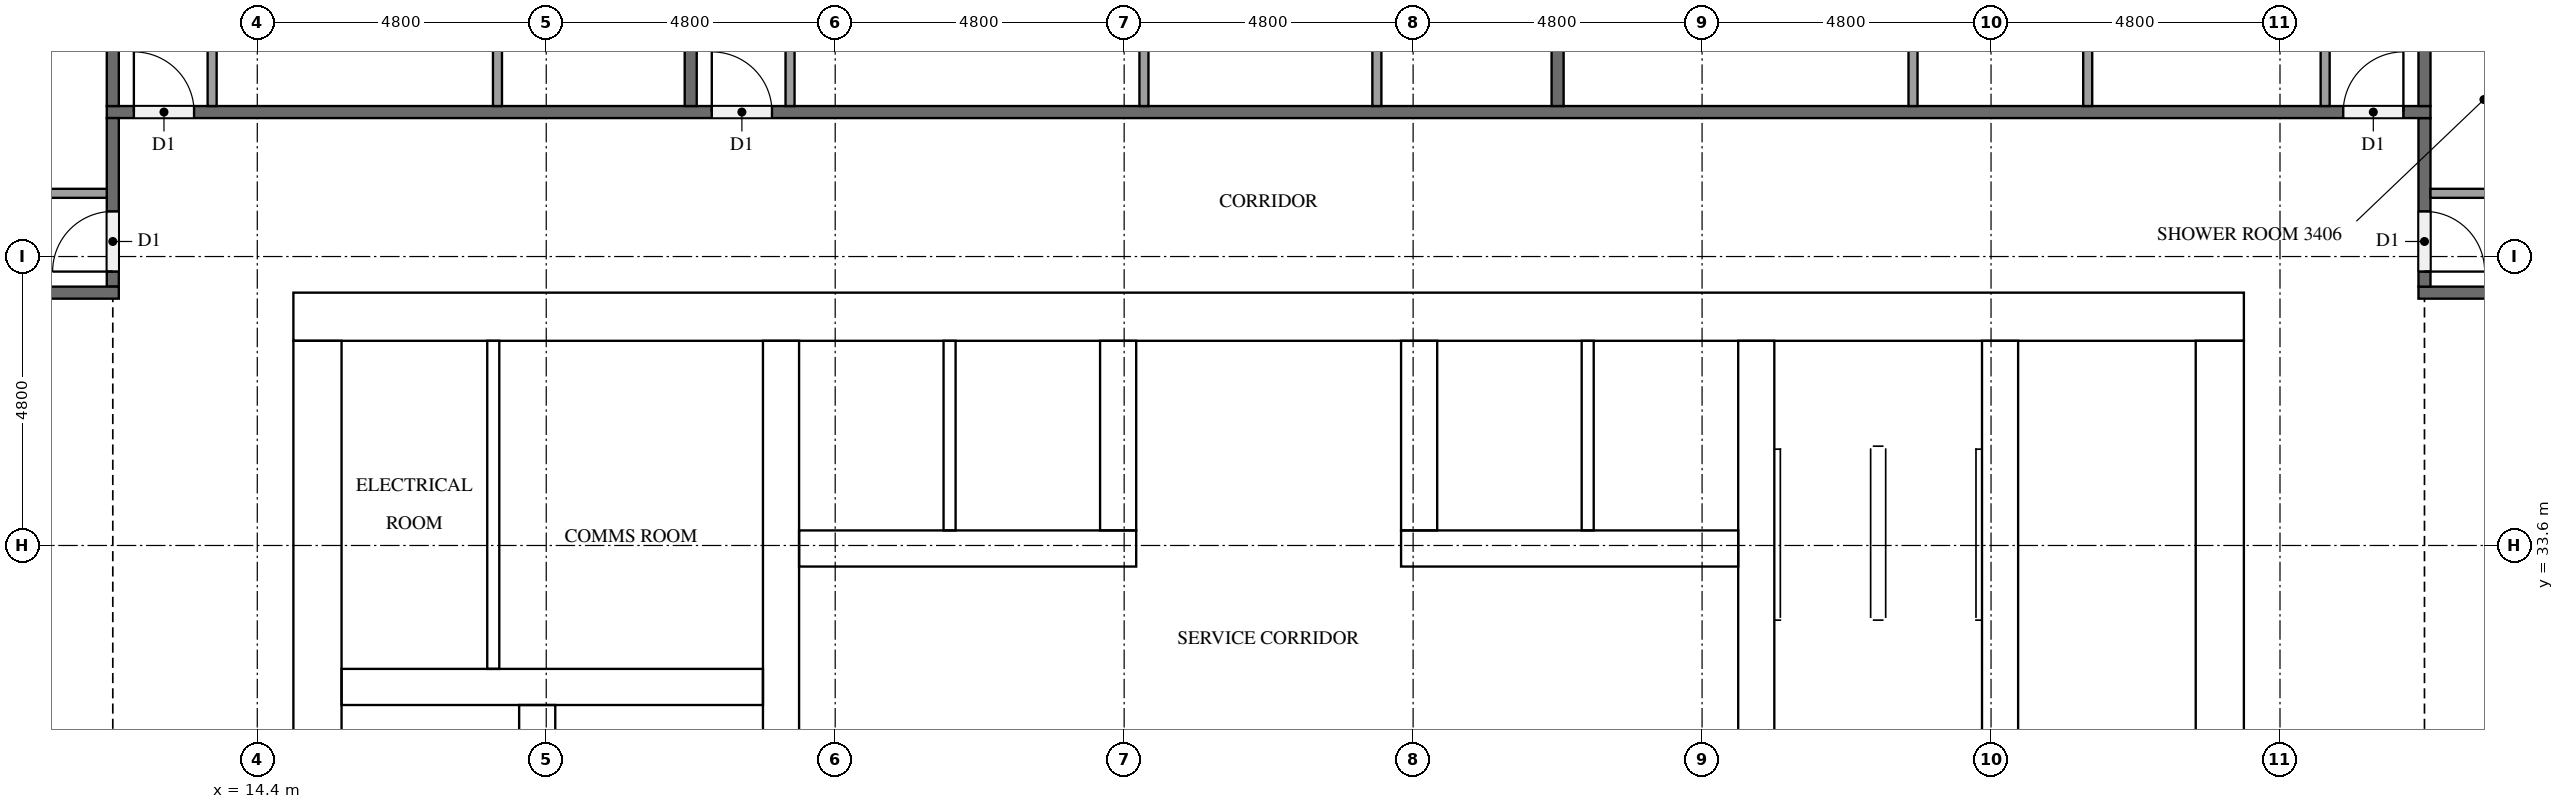
"""IFC4 building model, lengths in metres.
Left out: names, types, materials, properties, quantities, classifications, styles, units other than length and angle.
Written with IfcOpenShell. Run it as: python <this file> out.ifc"""

import sys

from ifc_helpers import new_model, si_unit, direction, frame, frame_2d, origin, place, context, subcontext, project, spatial, rectangle, extrude, element, fill, save


model = new_model("IFC4")
c1 = context("Model", 3, precision=1e-05, world=origin(), true_north=direction((0.0, 1.0)))
c2 = subcontext(c1, "Body", "Model", "MODEL_VIEW")
j1 = project(units=[si_unit("LENGTHUNIT", "METRE"), si_unit("PLANEANGLEUNIT", "RADIAN")], contexts=[c1])
p1 = place(None, origin())
s1 = spatial("IfcSite", under=j1, at=p1, CompositionType="ELEMENT")
p2 = place(p1, origin())
s2 = spatial("IfcBuilding", under=s1, at=p2, CompositionType="ELEMENT")
p3 = place(p2, frame((0.0, 0.0, 133.1)))
s3 = spatial("IfcBuildingStorey", under=s2, at=p3, CompositionType="ELEMENT", Elevation=133.1)
p4 = place(p3, frame((15.0, 37.4, 0.0), z_axis=(0.0, 0.0, 1.0), x_axis=(1.0, 0.0, 0.0)))
e1 = element("IfcWall", 1, at=p4, inside=s3, PredefinedType="SHEAR", context=c2, shape_type="SweptSolid", body=[
    extrude(rectangle(XDim=32.4, YDim=0.8, at=frame_2d((16.2, 0.0))), origin(), (0.0, 0.0, 1.0), 3.2),
])
p5 = place(p4, frame((15.3, 0.0, 0.0)))
e2 = element("IfcOpeningElement", 2, at=p5, cuts=e1, PredefinedType="OPENING", context=c2, shape_type="SweptSolid", body=[
    extrude(rectangle(XDim=1.8, YDim=2.1, at=frame_2d((0.9, 1.05))), frame((0.0, 0.41, 0.0), z_axis=(0.0, -1.0, 0.0), x_axis=(1.0, 0.0, 0.0)), (0.0, 0.0, 1.0), 0.82),
])
p6 = place(p4, frame((1.51, 0.0, 0.0)))
e3 = element("IfcOpeningElement", 3, at=p6, cuts=e1, PredefinedType="OPENING", context=c2, shape_type="SweptSolid", body=[
    extrude(rectangle(XDim=1.0, YDim=2.1, at=frame_2d((0.5, 1.05))), frame((0.0, 0.41, 0.0), z_axis=(0.0, -1.0, 0.0), x_axis=(1.0, 0.0, 0.0)), (0.0, 0.0, 1.0), 0.82),
])
p7 = place(p4, frame((5.11, 0.0, 0.0)))
e4 = element("IfcOpeningElement", 4, at=p7, cuts=e1, PredefinedType="OPENING", context=c2, shape_type="SweptSolid", body=[
    extrude(rectangle(XDim=1.0, YDim=2.1, at=frame_2d((0.5, 1.05))), frame((0.0, 0.41, 0.0), z_axis=(0.0, -1.0, 0.0), x_axis=(1.0, 0.0, 0.0)), (0.0, 0.0, 1.0), 0.82),
])
p8 = place(p3, frame((15.4, 15.8, 0.0), z_axis=(0.0, 0.0, 1.0), x_axis=(0.0, 1.0, 0.0)))
e5 = element("IfcWall", 5, at=p8, inside=s3, PredefinedType="SHEAR", context=c2, shape_type="SweptSolid", body=[
    extrude(rectangle(XDim=21.2, YDim=0.8, at=frame_2d((10.6, 0.0))), origin(), (0.0, 0.0, 1.0), 3.2),
])
p9 = place(p8, frame((4.96, 0.0, 0.0)))
e6 = element("IfcOpeningElement", 6, at=p9, cuts=e5, PredefinedType="OPENING", context=c2, shape_type="SweptSolid", body=[
    extrude(rectangle(XDim=1.2, YDim=2.1, at=frame_2d((0.6, 1.05))), frame((0.0, 0.41, 0.0), z_axis=(0.0, -1.0, 0.0), x_axis=(1.0, 0.0, 0.0)), (0.0, 0.0, 1.0), 0.82),
])
p10 = place(p3, frame((47.0, 15.8, 0.0), z_axis=(0.0, 0.0, 1.0), x_axis=(0.0, 1.0, 0.0)))
e7 = element("IfcWall", 7, at=p10, inside=s3, PredefinedType="SHEAR", context=c2, shape_type="SweptSolid", body=[
    extrude(rectangle(XDim=21.2, YDim=0.8, at=frame_2d((10.6, 0.0))), origin(), (0.0, 0.0, 1.0), 3.2),
])
p11 = place(p10, frame((10.3, 0.0, 0.0)))
e8 = element("IfcOpeningElement", 8, at=p11, cuts=e7, PredefinedType="OPENING", context=c2, shape_type="SweptSolid", body=[
    extrude(rectangle(XDim=1.2, YDim=2.1, at=frame_2d((0.6, 1.05))), frame((0.0, 0.41, 0.0), z_axis=(0.0, -1.0, 0.0), x_axis=(1.0, 0.0, 0.0)), (0.0, 0.0, 1.0), 0.82),
])
p12 = place(p3, frame((19.05, 15.8, 0.0), z_axis=(0.0, 0.0, 1.0), x_axis=(0.0, 1.0, 0.0)))
e9 = element("IfcWall", 9, at=p12, inside=s3, PredefinedType="SHEAR", context=c2, shape_type="SweptSolid", body=[
    extrude(rectangle(XDim=15.15, YDim=0.6, at=frame_2d((7.575, 0.0))), origin(), (0.0, 0.0, 1.0), 3.2),
])
p13 = place(p12, frame((9.65, 0.0, 0.0)))
e10 = element("IfcOpeningElement", 10, at=p13, cuts=e9, PredefinedType="OPENING", context=c2, shape_type="SweptSolid", body=[
    extrude(rectangle(XDim=1.1, YDim=2.1, at=frame_2d((0.55, 1.05))), frame((0.0, 0.31, 0.0), z_axis=(0.0, -1.0, 0.0), x_axis=(1.0, 0.0, 0.0)), (0.0, 0.0, 1.0), 0.62),
])
p14 = place(p12, frame((13.15, 0.0, 0.0)))
e11 = element("IfcOpeningElement", 11, at=p14, cuts=e9, PredefinedType="OPENING", context=c2, shape_type="SweptSolid", body=[
    extrude(rectangle(XDim=1.1, YDim=2.1, at=frame_2d((0.55, 1.05))), frame((0.0, 0.31, 0.0), z_axis=(0.0, -1.0, 0.0), x_axis=(1.0, 0.0, 0.0)), (0.0, 0.0, 1.0), 0.62),
])
p15 = place(p12, frame((0.4, 0.0, 0.0)))
e12 = element("IfcOpeningElement", 12, at=p15, cuts=e9, PredefinedType="OPENING", context=c2, shape_type="SweptSolid", body=[
    extrude(rectangle(XDim=1.2, YDim=2.1, at=frame_2d((0.6, 1.05))), frame((0.0, 0.31, 0.0), z_axis=(0.0, -1.0, 0.0), x_axis=(1.0, 0.0, 0.0)), (0.0, 0.0, 1.0), 0.62),
])
p16 = place(p3, frame((23.1, 15.8, 0.0), z_axis=(0.0, 0.0, 1.0), x_axis=(0.0, 1.0, 0.0)))
e13 = element("IfcWall", 13, at=p16, inside=s3, PredefinedType="SHEAR", context=c2, shape_type="SweptSolid", body=[
    extrude(rectangle(XDim=21.2, YDim=0.6, at=frame_2d((10.6, 0.0))), origin(), (0.0, 0.0, 1.0), 3.2),
])
p17 = place(p3, frame((39.3, 27.75, 0.0), z_axis=(0.0, 0.0, 1.0), x_axis=(0.0, 1.0, 0.0)))
e14 = element("IfcWall", 14, at=p17, inside=s3, PredefinedType="SHEAR", context=c2, shape_type="SweptSolid", body=[
    extrude(rectangle(XDim=9.25, YDim=0.6, at=frame_2d((4.625, 0.0))), origin(), (0.0, 0.0, 1.0), 3.2),
])
p18 = place(p3, frame((43.35, 27.75, 0.0), z_axis=(0.0, 0.0, 1.0), x_axis=(0.0, 1.0, 0.0)))
e15 = element("IfcWall", 15, at=p18, inside=s3, PredefinedType="SHEAR", context=c2, shape_type="SweptSolid", body=[
    extrude(rectangle(XDim=9.25, YDim=0.6, at=frame_2d((4.625, 0.0))), origin(), (0.0, 0.0, 1.0), 3.2),
])
p19 = place(p18, frame((7.65, 0.0, 0.0)))
e16 = element("IfcOpeningElement", 16, at=p19, cuts=e15, PredefinedType="OPENING", context=c2, shape_type="SweptSolid", body=[
    extrude(rectangle(XDim=1.2, YDim=2.1, at=frame_2d((0.6, 1.05))), frame((0.0, 0.31, 0.0), z_axis=(0.0, -1.0, 0.0), x_axis=(1.0, 0.0, 0.0)), (0.0, 0.0, 1.0), 0.62),
])
p20 = place(p3, frame((15.8, 31.25, 0.0), z_axis=(0.0, 0.0, 1.0), x_axis=(1.0, 0.0, 0.0)))
e17 = element("IfcWall", 17, at=p20, inside=s3, PredefinedType="SHEAR", context=c2, shape_type="SweptSolid", body=[
    extrude(rectangle(XDim=7.0, YDim=0.6, at=frame_2d((3.5, 0.0))), origin(), (0.0, 0.0, 1.0), 3.2),
])
for number, where, z_axis, x_axis in (
    (18, (23.4, 33.55, 0.0), (0.0, 0.0, 1.0), (1.0, 0.0, 0.0)),
    (19, (33.4, 33.55, 0.0), (0.0, 0.0, 1.0), (1.0, 0.0, 0.0)),
):
    element("IfcWall", number, at=place(p3, frame(where, z_axis=z_axis, x_axis=x_axis)), inside=s3, PredefinedType="SHEAR", context=c2, shape_type="SweptSolid", body=[
        extrude(rectangle(XDim=5.6, YDim=0.6, at=frame_2d((2.8, 0.0))), origin(), (0.0, 0.0, 1.0), 3.2),
    ])
for number, where, z_axis, x_axis in (
    (20, (28.7, 33.85, 0.0), (0.0, 0.0, 1.0), (0.0, 1.0, 0.0)),
    (21, (33.7, 33.85, 0.0), (0.0, 0.0, 1.0), (0.0, 1.0, 0.0)),
):
    element("IfcWall", number, at=place(p3, frame(where, z_axis=z_axis, x_axis=x_axis)), inside=s3, PredefinedType="SHEAR", context=c2, shape_type="SweptSolid", body=[
        extrude(rectangle(XDim=3.15, YDim=0.6, at=frame_2d((1.575, 0.0))), origin(), (0.0, 0.0, 1.0), 3.2),
    ])
for number, where, z_axis, x_axis in (
    (22, (25.9, 33.85, 0.0), (0.0, 0.0, 1.0), (0.0, 1.0, 0.0)),
    (23, (36.5, 33.85, 0.0), (0.0, 0.0, 1.0), (0.0, 1.0, 0.0)),
):
    element("IfcWall", number, at=place(p3, frame(where, z_axis=z_axis, x_axis=x_axis)), inside=s3, PredefinedType="SOLIDWALL", context=c2, shape_type="SweptSolid", body=[
        extrude(rectangle(XDim=3.15, YDim=0.2, at=frame_2d((1.575, 0.0))), origin(), (0.0, 0.0, 1.0), 3.2),
    ])
p21 = place(p3, frame((18.32, 31.55, 0.0), z_axis=(0.0, 0.0, 1.0), x_axis=(0.0, 1.0, 0.0)))
e24 = element("IfcWall", 24, at=p21, inside=s3, PredefinedType="PARTITIONING", context=c2, shape_type="SweptSolid", body=[
    extrude(rectangle(XDim=5.45, YDim=0.2, at=frame_2d((2.725, 0.0))), origin(), (0.0, 0.0, 1.0), 3.2),
])
p22 = place(p3, frame((52.5, 37.8, 0.0), z_axis=(0.0, 0.0, 1.0), x_axis=(-1.0, 0.0, 0.0)))
e25 = element("IfcWall", 25, at=p22, inside=s3, PredefinedType="PARTITIONING", context=c2, shape_type="SweptSolid", body=[
    extrude(rectangle(XDim=2.2, YDim=0.2, at=frame_2d((1.1, 0.0))), origin(), (0.0, 0.0, 1.0), 3.2),
])
p23 = place(p3, frame((50.4, 40.7, 0.0), z_axis=(0.0, 0.0, 1.0), x_axis=(0.0, -1.0, 0.0)))
e26 = element("IfcWall", 26, at=p23, inside=s3, PredefinedType="PARTITIONING", context=c2, shape_type="SweptSolid", body=[
    extrude(rectangle(XDim=2.8, YDim=0.2, at=frame_2d((1.4, 0.0))), origin(), (0.0, 0.0, 1.0), 3.2),
])
p24 = place(p23, frame((1.55, 0.0, 0.0)))
e27 = element("IfcOpeningElement", 27, at=p24, cuts=e26, PredefinedType="OPENING", context=c2, shape_type="SweptSolid", body=[
    extrude(rectangle(XDim=1.0, YDim=2.1, at=frame_2d((0.5, 1.05))), frame((0.0, 0.11, 0.0), z_axis=(0.0, -1.0, 0.0), x_axis=(1.0, 0.0, 0.0)), (0.0, 0.0, 1.0), 0.22),
])
p25 = place(p3, frame((11.9, 40.8, 0.0), z_axis=(0.0, 0.0, 1.0), x_axis=(1.0, 0.0, 0.0)))
e28 = element("IfcWall", 28, at=p25, inside=s3, PredefinedType="PARTITIONING", context=c2, shape_type="SweptSolid", body=[
    extrude(rectangle(XDim=38.6, YDim=0.2, at=frame_2d((19.3, 0.0))), origin(), (0.0, 0.0, 1.0), 3.2),
])
p26 = place(p25, frame((37.15, 0.0, 0.0)))
e29 = element("IfcOpeningElement", 29, at=p26, cuts=e28, PredefinedType="OPENING", context=c2, shape_type="SweptSolid", body=[
    extrude(rectangle(XDim=1.0, YDim=2.1, at=frame_2d((0.5, 1.05))), frame((0.0, 0.11, 0.0), z_axis=(0.0, -1.0, 0.0), x_axis=(1.0, 0.0, 0.0)), (0.0, 0.0, 1.0), 0.22),
])
p27 = place(p25, frame((10.05, 0.0, 0.0)))
e30 = element("IfcOpeningElement", 30, at=p27, cuts=e28, PredefinedType="OPENING", context=c2, shape_type="SweptSolid", body=[
    extrude(rectangle(XDim=1.0, YDim=2.1, at=frame_2d((0.5, 1.05))), frame((0.0, 0.11, 0.0), z_axis=(0.0, -1.0, 0.0), x_axis=(1.0, 0.0, 0.0)), (0.0, 0.0, 1.0), 0.22),
])
p28 = place(p25, frame((0.45, 0.0, 0.0)))
e31 = element("IfcOpeningElement", 31, at=p28, cuts=e28, PredefinedType="OPENING", context=c2, shape_type="SweptSolid", body=[
    extrude(rectangle(XDim=1.0, YDim=2.1, at=frame_2d((0.5, 1.05))), frame((0.0, 0.11, 0.0), z_axis=(0.0, -1.0, 0.0), x_axis=(1.0, 0.0, 0.0)), (0.0, 0.0, 1.0), 0.22),
])
p29 = place(p3, frame((12.0, 37.9, 0.0), z_axis=(0.0, 0.0, 1.0), x_axis=(0.0, 1.0, 0.0)))
e32 = element("IfcWall", 32, at=p29, inside=s3, PredefinedType="PARTITIONING", context=c2, shape_type="SweptSolid", body=[
    extrude(rectangle(XDim=2.8, YDim=0.2, at=frame_2d((1.4, 0.0))), origin(), (0.0, 0.0, 1.0), 3.2),
])
p30 = place(p29, frame((0.25, 0.0, 0.0)))
e33 = element("IfcOpeningElement", 33, at=p30, cuts=e32, PredefinedType="OPENING", context=c2, shape_type="SweptSolid", body=[
    extrude(rectangle(XDim=1.0, YDim=2.1, at=frame_2d((0.5, 1.05))), frame((0.0, 0.11, 0.0), z_axis=(0.0, -1.0, 0.0), x_axis=(1.0, 0.0, 0.0)), (0.0, 0.0, 1.0), 0.22),
])
p31 = place(p3, frame((12.1, 37.8, 0.0), z_axis=(0.0, 0.0, 1.0), x_axis=(-1.0, 0.0, 0.0)))
e34 = element("IfcWall", 34, at=p31, inside=s3, PredefinedType="PARTITIONING", context=c2, shape_type="SweptSolid", body=[
    extrude(rectangle(XDim=2.2, YDim=0.2, at=frame_2d((1.1, 0.0))), origin(), (0.0, 0.0, 1.0), 3.2),
])
for number, where, z_axis, x_axis in (
    (35, (50.4, 40.9, 0.0), (0.0, 0.0, 1.0), (0.0, 1.0, 0.0)),
    (36, (36.0, 52.7, 0.0), (0.0, 0.0, 1.0), (0.0, -1.0, 0.0)),
    (37, (21.6, 52.7, 0.0), (0.0, 0.0, 1.0), (0.0, -1.0, 0.0)),
    (38, (12.0, 52.7, 0.0), (0.0, 0.0, 1.0), (0.0, -1.0, 0.0)),
):
    element("IfcWall", number, at=place(p3, frame(where, z_axis=z_axis, x_axis=x_axis)), inside=s3, PredefinedType="PARTITIONING", context=c2, shape_type="SweptSolid", body=[
        extrude(rectangle(XDim=11.8, YDim=0.2, at=frame_2d((5.9, 0.0))), origin(), (0.0, 0.0, 1.0), 3.2),
    ])
p32 = place(p3, frame((50.5, 39.45, 0.0), z_axis=(0.0, 0.0, 1.0), x_axis=(1.0, 0.0, 0.0)))
e39 = element("IfcWall", 39, at=p32, inside=s3, PredefinedType="PARTITIONING", context=c2, shape_type="SweptSolid", body=[
    extrude(rectangle(XDim=1.925, YDim=0.15, at=frame_2d((0.962, 0.0))), origin(), (0.0, 0.0, 1.0), 3.2),
])
for number, where, z_axis, x_axis in (
    (40, (44.806, 40.9, 0.0), (0.0, 0.0, 1.0), (0.0, 1.0, 0.0)),
    (41, (41.904, 40.9, 0.0), (0.0, 0.0, 1.0), (0.0, 1.0, 0.0)),
):
    element("IfcWall", number, at=place(p3, frame(where, z_axis=z_axis, x_axis=x_axis)), inside=s3, PredefinedType="PARTITIONING", context=c2, shape_type="SweptSolid", body=[
        extrude(rectangle(XDim=4.175, YDim=0.15, at=frame_2d((2.087, 0.0))), origin(), (0.0, 0.0, 1.0), 3.2),
    ])
p33 = place(p3, frame((48.75, 40.9, 0.0), z_axis=(0.0, 0.0, 1.0), x_axis=(0.0, 1.0, 0.0)))
e42 = element("IfcWall", 42, at=p33, inside=s3, PredefinedType="PARTITIONING", context=c2, shape_type="SweptSolid", body=[
    extrude(rectangle(XDim=4.325, YDim=0.15, at=frame_2d((2.163, 0.0))), origin(), (0.0, 0.0, 1.0), 3.2),
])
for number, where, z_axis, x_axis in (
    (43, (29.129, 40.9, 0.0), (0.0, 0.0, 1.0), (0.0, 1.0, 0.0)),
    (44, (32.998, 40.9, 0.0), (0.0, 0.0, 1.0), (0.0, 1.0, 0.0)),
):
    element("IfcWall", number, at=place(p3, frame(where, z_axis=z_axis, x_axis=x_axis)), inside=s3, PredefinedType="PARTITIONING", context=c2, shape_type="SweptSolid", body=[
        extrude(rectangle(XDim=2.975, YDim=0.15, at=frame_2d((1.488, 0.0))), origin(), (0.0, 0.0, 1.0), 3.2),
    ])
p34 = place(p3, frame((23.25, 40.9, 0.0), z_axis=(0.0, 0.0, 1.0), x_axis=(0.0, 1.0, 0.0)))
e45 = element("IfcWall", 45, at=p34, inside=s3, PredefinedType="PARTITIONING", context=c2, shape_type="SweptSolid", body=[
    extrude(rectangle(XDim=3.125, YDim=0.15, at=frame_2d((1.562, 0.0))), origin(), (0.0, 0.0, 1.0), 3.2),
])
p35 = place(p3, frame((18.39, 40.9, 0.0), z_axis=(0.0, 0.0, 1.0), x_axis=(0.0, 1.0, 0.0)))
e46 = element("IfcWall", 46, at=p35, inside=s3, PredefinedType="PARTITIONING", context=c2, shape_type="SweptSolid", body=[
    extrude(rectangle(XDim=3.725, YDim=0.15, at=frame_2d((1.863, 0.0))), origin(), (0.0, 0.0, 1.0), 3.2),
])
p36 = place(p3, frame((13.65, 40.9, 0.0), z_axis=(0.0, 0.0, 1.0), x_axis=(0.0, 1.0, 0.0)))
e47 = element("IfcWall", 47, at=p36, inside=s3, PredefinedType="PARTITIONING", context=c2, shape_type="SweptSolid", body=[
    extrude(rectangle(XDim=3.875, YDim=0.15, at=frame_2d((1.938, 0.0))), origin(), (0.0, 0.0, 1.0), 3.2),
])
p37 = place(p3, frame((11.9, 39.45, 0.0), z_axis=(0.0, 0.0, 1.0), x_axis=(-1.0, 0.0, 0.0)))
e48 = element("IfcWall", 48, at=p37, inside=s3, PredefinedType="PARTITIONING", context=c2, shape_type="SweptSolid", body=[
    extrude(rectangle(XDim=3.425, YDim=0.15, at=frame_2d((1.712, 0.0))), origin(), (0.0, 0.0, 1.0), 3.2),
])
p38 = place(p19, origin())
e49 = element("IfcDoor", 49, at=p38, inside=s3, OperationType="SINGLE_SWING_RIGHT", PredefinedType="DOOR", context=c2, shape_type="SweptSolid", body=[
    extrude(rectangle(XDim=1.2, YDim=2.1, at=frame_2d((0.6, 1.05))), frame((0.0, 0.025, 0.0), z_axis=(0.0, -1.0, 0.0), x_axis=(1.0, 0.0, 0.0)), (0.0, 0.0, 1.0), 0.05),
])
fill(e16, e49)
p39 = place(p5, origin())
e50 = element("IfcDoor", 50, at=p39, inside=s3, OperationType="DOUBLE_DOOR_SINGLE_SWING", PredefinedType="DOOR", context=c2, shape_type="SweptSolid", body=[
    extrude(rectangle(XDim=1.8, YDim=2.1, at=frame_2d((0.9, 1.05))), frame((0.0, 0.025, 0.0), z_axis=(0.0, -1.0, 0.0), x_axis=(1.0, 0.0, 0.0)), (0.0, 0.0, 1.0), 0.05),
])
fill(e2, e50)
p40 = place(p6, origin())
e51 = element("IfcDoor", 51, at=p40, inside=s3, OperationType="SINGLE_SWING_LEFT", PredefinedType="DOOR", context=c2, shape_type="SweptSolid", body=[
    extrude(rectangle(XDim=1.0, YDim=2.1, at=frame_2d((0.5, 1.05))), frame((0.0, 0.025, 0.0), z_axis=(0.0, -1.0, 0.0), x_axis=(1.0, 0.0, 0.0)), (0.0, 0.0, 1.0), 0.05),
])
fill(e3, e51)
p41 = place(p7, origin())
e52 = element("IfcDoor", 52, at=p41, inside=s3, OperationType="SINGLE_SWING_RIGHT", PredefinedType="DOOR", context=c2, shape_type="SweptSolid", body=[
    extrude(rectangle(XDim=1.0, YDim=2.1, at=frame_2d((0.5, 1.05))), frame((0.0, 0.025, 0.0), z_axis=(0.0, -1.0, 0.0), x_axis=(1.0, 0.0, 0.0)), (0.0, 0.0, 1.0), 0.05),
])
fill(e4, e52)
p42 = place(p24, origin())
e53 = element("IfcDoor", 53, at=p42, inside=s3, OperationType="SINGLE_SWING_RIGHT", PredefinedType="DOOR", context=c2, shape_type="SweptSolid", body=[
    extrude(rectangle(XDim=1.0, YDim=2.1, at=frame_2d((0.5, 1.05))), frame((0.0, 0.025, 0.0), z_axis=(0.0, -1.0, 0.0), x_axis=(1.0, 0.0, 0.0)), (0.0, 0.0, 1.0), 0.05),
])
fill(e27, e53)
p43 = place(p26, origin())
e54 = element("IfcDoor", 54, at=p43, inside=s3, OperationType="SINGLE_SWING_RIGHT", PredefinedType="DOOR", context=c2, shape_type="SweptSolid", body=[
    extrude(rectangle(XDim=1.0, YDim=2.1, at=frame_2d((0.5, 1.05))), frame((0.0, 0.025, 0.0), z_axis=(0.0, -1.0, 0.0), x_axis=(1.0, 0.0, 0.0)), (0.0, 0.0, 1.0), 0.05),
])
fill(e29, e54)
p44 = place(p27, origin())
e55 = element("IfcDoor", 55, at=p44, inside=s3, OperationType="SINGLE_SWING_LEFT", PredefinedType="DOOR", context=c2, shape_type="SweptSolid", body=[
    extrude(rectangle(XDim=1.0, YDim=2.1, at=frame_2d((0.5, 1.05))), frame((0.0, 0.025, 0.0), z_axis=(0.0, -1.0, 0.0), x_axis=(1.0, 0.0, 0.0)), (0.0, 0.0, 1.0), 0.05),
])
fill(e30, e55)
p45 = place(p28, origin())
e56 = element("IfcDoor", 56, at=p45, inside=s3, OperationType="SINGLE_SWING_LEFT", PredefinedType="DOOR", context=c2, shape_type="SweptSolid", body=[
    extrude(rectangle(XDim=1.0, YDim=2.1, at=frame_2d((0.5, 1.05))), frame((0.0, 0.025, 0.0), z_axis=(0.0, -1.0, 0.0), x_axis=(1.0, 0.0, 0.0)), (0.0, 0.0, 1.0), 0.05),
])
fill(e31, e56)
p46 = place(p30, origin())
e57 = element("IfcDoor", 57, at=p46, inside=s3, OperationType="SINGLE_SWING_LEFT", PredefinedType="DOOR", context=c2, shape_type="SweptSolid", body=[
    extrude(rectangle(XDim=1.0, YDim=2.1, at=frame_2d((0.5, 1.05))), frame((0.0, 0.025, 0.0), z_axis=(0.0, -1.0, 0.0), x_axis=(1.0, 0.0, 0.0)), (0.0, 0.0, 1.0), 0.05),
])
fill(e33, e57)
save(model, sys.argv[1])
